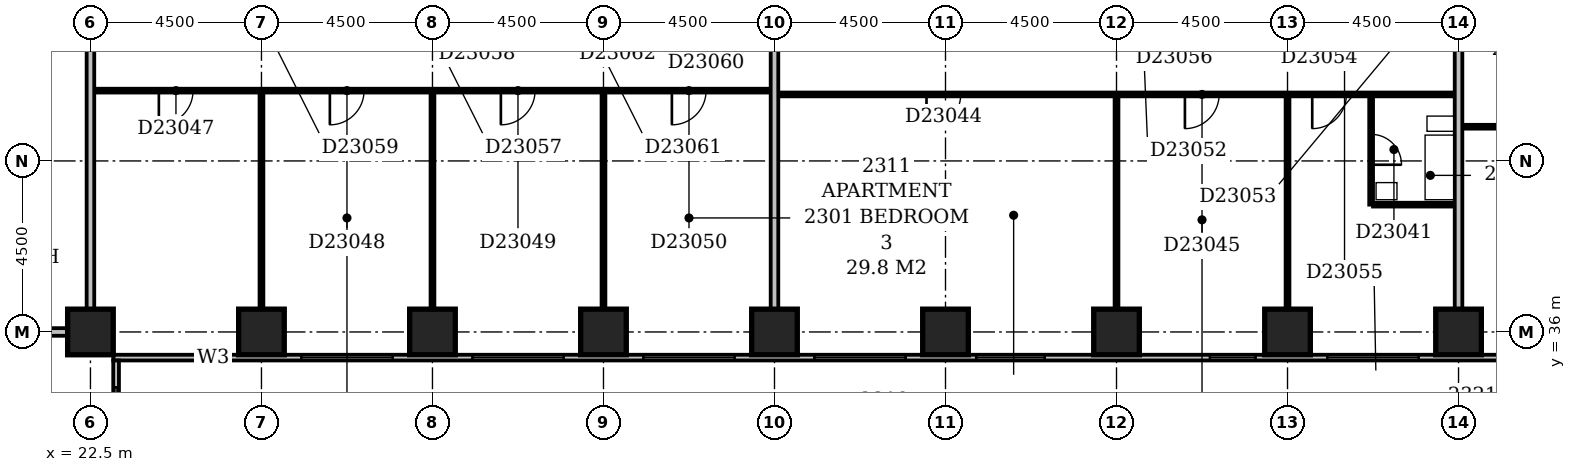
"""IFC4 building model, lengths in metres.
Left out: names, types, materials, properties, quantities, classifications, styles, units other than length and angle.
Written with IfcOpenShell. Run it as: python <this file> out.ifc"""

import sys

from ifc_helpers import new_model, si_unit, direction, frame, frame_2d, origin, origin_2d, place, context, subcontext, project, spatial, rectangle, extrude, element, fill, save


model = new_model("IFC4")
c1 = context("Model", 3, precision=1e-05, world=origin(), true_north=direction((0.0, 1.0)))
c2 = subcontext(c1, "Body", "Model", "MODEL_VIEW")
j1 = project(units=[si_unit("LENGTHUNIT", "METRE"), si_unit("PLANEANGLEUNIT", "RADIAN")], contexts=[c1])
p1 = place(None, origin())
s1 = spatial("IfcSite", under=j1, at=p1, CompositionType="ELEMENT")
p2 = place(p1, origin())
s2 = spatial("IfcBuilding", under=s1, at=p2, CompositionType="ELEMENT")
p3 = place(p2, frame((0.0, 0.0, 93.8)))
s3 = spatial("IfcBuildingStorey", under=s2, at=p3, CompositionType="ELEMENT", Elevation=93.8)
for number, where, z_axis, x_axis in (
    (1, (22.5, 36.0, -0.3), (0.0, 0.0, 1.0), (1.0, 0.0, 0.0)),
    (2, (27.0, 36.0, -0.3), (0.0, 0.0, 1.0), (1.0, 0.0, 0.0)),
    (3, (31.5, 36.0, -0.3), (0.0, 0.0, 1.0), (1.0, 0.0, 0.0)),
    (4, (36.0, 36.0, -0.3), (0.0, 0.0, 1.0), (1.0, 0.0, 0.0)),
    (5, (40.5, 36.0, -0.3), (0.0, 0.0, 1.0), (1.0, 0.0, 0.0)),
    (6, (45.0, 36.0, -0.3), (0.0, 0.0, 1.0), (1.0, 0.0, 0.0)),
    (7, (49.5, 36.0, -0.3), (0.0, 0.0, 1.0), (1.0, 0.0, 0.0)),
    (8, (54.0, 36.0, -0.3), (0.0, 0.0, 1.0), (1.0, 0.0, 0.0)),
    (9, (58.5, 36.0, -0.3), (0.0, 0.0, 1.0), (1.0, 0.0, 0.0)),
):
    element("IfcColumn", number, at=place(p3, frame(where, z_axis=z_axis, x_axis=x_axis)), inside=s3, PredefinedType="COLUMN", context=c2, shape_type="SweptSolid", body=[
        extrude(rectangle(XDim=1.2, YDim=1.2, at=origin_2d()), origin(), (0.0, 0.0, 1.0), 3.6),
    ])
p4 = place(p3, frame((23.175, 17.4, 0.0), z_axis=(0.0, 0.0, 1.0), x_axis=(0.0, 1.0, 0.0)))
e10 = element("IfcWall", 10, at=p4, inside=s3, PredefinedType="STANDARD", context=c2, shape_type="SweptSolid", body=[
    extrude(rectangle(XDim=17.85, YDim=0.15, at=frame_2d((8.925, 0.0))), origin(), (0.0, 0.0, 1.0), 2.7),
])
p5 = place(p4, frame((2.999, 0.0, 0.6)))
e11 = element("IfcOpeningElement", 11, at=p5, cuts=e10, PredefinedType="OPENING", context=c2, shape_type="SweptSolid", body=[
    extrude(rectangle(XDim=1.2, YDim=1.8, at=frame_2d((0.6, 0.9))), frame((0.0, 0.087, 0.0), z_axis=(0.0, -1.0, 0.0), x_axis=(1.0, 0.0, 0.0)), (0.0, 0.0, 1.0), 0.174),
])
p6 = place(p4, frame((6.15, 0.0, 0.6)))
e12 = element("IfcOpeningElement", 12, at=p6, cuts=e10, PredefinedType="OPENING", context=c2, shape_type="SweptSolid", body=[
    extrude(rectangle(XDim=2.4, YDim=1.8, at=frame_2d((1.2, 0.9))), frame((0.0, 0.087, 0.0), z_axis=(0.0, -1.0, 0.0), x_axis=(1.0, 0.0, 0.0)), (0.0, 0.0, 1.0), 0.174),
])
p7 = place(p4, frame((10.65, 0.0, 0.6)))
e13 = element("IfcOpeningElement", 13, at=p7, cuts=e10, PredefinedType="OPENING", context=c2, shape_type="SweptSolid", body=[
    extrude(rectangle(XDim=2.4, YDim=1.8, at=frame_2d((1.2, 0.9))), frame((0.0, 0.087, 0.0), z_axis=(0.0, -1.0, 0.0), x_axis=(1.0, 0.0, 0.0)), (0.0, 0.0, 1.0), 0.174),
])
p8 = place(p4, frame((15.043, 0.0, 0.6)))
e14 = element("IfcOpeningElement", 14, at=p8, cuts=e10, PredefinedType="OPENING", context=c2, shape_type="SweptSolid", body=[
    extrude(rectangle(XDim=2.1, YDim=1.8, at=frame_2d((1.05, 0.9))), frame((0.0, 0.087, 0.0), z_axis=(0.0, -1.0, 0.0), x_axis=(1.0, 0.0, 0.0)), (0.0, 0.0, 1.0), 0.174),
])
p9 = place(p3, frame((23.1, 35.325, 0.0), z_axis=(0.0, 0.0, 1.0), x_axis=(1.0, 0.0, 0.0)))
e15 = element("IfcWall", 15, at=p9, inside=s3, PredefinedType="STANDARD", context=c2, shape_type="SweptSolid", body=[
    extrude(rectangle(XDim=45.15, YDim=0.15, at=frame_2d((22.575, 0.0))), origin(), (0.0, 0.0, 1.0), 2.7),
])
p10 = place(p9, frame((2.185, 0.0, 0.6)))
e16 = element("IfcOpeningElement", 16, at=p10, cuts=e15, PredefinedType="OPENING", context=c2, shape_type="SweptSolid", body=[
    extrude(rectangle(XDim=0.9, YDim=1.8, at=frame_2d((0.45, 0.9))), frame((0.0, 0.087, 0.0), z_axis=(0.0, -1.0, 0.0), x_axis=(1.0, 0.0, 0.0)), (0.0, 0.0, 1.0), 0.174),
])
p11 = place(p9, frame((4.95, 0.0, 0.6)))
e17 = element("IfcOpeningElement", 17, at=p11, cuts=e15, PredefinedType="OPENING", context=c2, shape_type="SweptSolid", body=[
    extrude(rectangle(XDim=2.4, YDim=1.8, at=frame_2d((1.2, 0.9))), frame((0.0, 0.087, 0.0), z_axis=(0.0, -1.0, 0.0), x_axis=(1.0, 0.0, 0.0)), (0.0, 0.0, 1.0), 0.174),
])
p12 = place(p9, frame((9.45, 0.0, 0.6)))
e18 = element("IfcOpeningElement", 18, at=p12, cuts=e15, PredefinedType="OPENING", context=c2, shape_type="SweptSolid", body=[
    extrude(rectangle(XDim=2.4, YDim=1.8, at=frame_2d((1.2, 0.9))), frame((0.0, 0.087, 0.0), z_axis=(0.0, -1.0, 0.0), x_axis=(1.0, 0.0, 0.0)), (0.0, 0.0, 1.0), 0.174),
])
p13 = place(p9, frame((13.95, 0.0, 0.6)))
e19 = element("IfcOpeningElement", 19, at=p13, cuts=e15, PredefinedType="OPENING", context=c2, shape_type="SweptSolid", body=[
    extrude(rectangle(XDim=2.4, YDim=1.8, at=frame_2d((1.2, 0.9))), frame((0.0, 0.087, 0.0), z_axis=(0.0, -1.0, 0.0), x_axis=(1.0, 0.0, 0.0)), (0.0, 0.0, 1.0), 0.174),
])
p14 = place(p9, frame((18.45, 0.0, 0.6)))
e20 = element("IfcOpeningElement", 20, at=p14, cuts=e15, PredefinedType="OPENING", context=c2, shape_type="SweptSolid", body=[
    extrude(rectangle(XDim=2.4, YDim=1.8, at=frame_2d((1.2, 0.9))), frame((0.0, 0.087, 0.0), z_axis=(0.0, -1.0, 0.0), x_axis=(1.0, 0.0, 0.0)), (0.0, 0.0, 1.0), 0.174),
])
p15 = place(p9, frame((22.71, 0.0, 0.6)))
e21 = element("IfcOpeningElement", 21, at=p15, cuts=e15, PredefinedType="OPENING", context=c2, shape_type="SweptSolid", body=[
    extrude(rectangle(XDim=1.8, YDim=1.8, at=frame_2d((0.9, 0.9))), frame((0.0, 0.087, 0.0), z_axis=(0.0, -1.0, 0.0), x_axis=(1.0, 0.0, 0.0)), (0.0, 0.0, 1.0), 0.174),
])
p16 = place(p9, frame((28.859, 0.0, 0.6)))
e22 = element("IfcOpeningElement", 22, at=p16, cuts=e15, PredefinedType="OPENING", context=c2, shape_type="SweptSolid", body=[
    extrude(rectangle(XDim=1.2, YDim=1.8, at=frame_2d((0.6, 0.9))), frame((0.0, 0.087, 0.0), z_axis=(0.0, -1.0, 0.0), x_axis=(1.0, 0.0, 0.0)), (0.0, 0.0, 1.0), 0.174),
])
p17 = place(p9, frame((31.95, 0.0, 0.6)))
e23 = element("IfcOpeningElement", 23, at=p17, cuts=e15, PredefinedType="OPENING", context=c2, shape_type="SweptSolid", body=[
    extrude(rectangle(XDim=2.4, YDim=1.8, at=frame_2d((1.2, 0.9))), frame((0.0, 0.087, 0.0), z_axis=(0.0, -1.0, 0.0), x_axis=(1.0, 0.0, 0.0)), (0.0, 0.0, 1.0), 0.174),
])
p18 = place(p9, frame((36.45, 0.0, 0.6)))
e24 = element("IfcOpeningElement", 24, at=p18, cuts=e15, PredefinedType="OPENING", context=c2, shape_type="SweptSolid", body=[
    extrude(rectangle(XDim=2.4, YDim=1.8, at=frame_2d((1.2, 0.9))), frame((0.0, 0.087, 0.0), z_axis=(0.0, -1.0, 0.0), x_axis=(1.0, 0.0, 0.0)), (0.0, 0.0, 1.0), 0.174),
])
p19 = place(p9, frame((40.95, 0.0, 0.6)))
e25 = element("IfcOpeningElement", 25, at=p19, cuts=e15, PredefinedType="OPENING", context=c2, shape_type="SweptSolid", body=[
    extrude(rectangle(XDim=2.4, YDim=1.8, at=frame_2d((1.2, 0.9))), frame((0.0, 0.087, 0.0), z_axis=(0.0, -1.0, 0.0), x_axis=(1.0, 0.0, 0.0)), (0.0, 0.0, 1.0), 0.174),
])
p20 = place(p3, frame((9.1, 36.0, 0.0), z_axis=(0.0, 0.0, 1.0), x_axis=(1.0, 0.0, 0.0)))
e26 = element("IfcWall", 26, at=p20, inside=s3, PredefinedType="PARTITIONING", context=c2, shape_type="SweptSolid", body=[
    extrude(rectangle(XDim=12.8, YDim=0.2, at=frame_2d((6.4, 0.0))), origin(), (0.0, 0.0, 1.0), 2.4),
])
p21 = place(p3, frame((22.5, 36.6, 0.0), z_axis=(0.0, 0.0, 1.0), x_axis=(0.0, 1.0, 0.0)))
e27 = element("IfcWall", 27, at=p21, inside=s3, PredefinedType="PARTITIONING", context=c2, shape_type="SweptSolid", body=[
    extrude(rectangle(XDim=12.8, YDim=0.2, at=frame_2d((6.4, 0.0))), origin(), (0.0, 0.0, 1.0), 3.3),
])
p22 = place(p3, frame((27.0, 36.6, 0.0), z_axis=(0.0, 0.0, 1.0), x_axis=(0.0, 1.0, 0.0)))
e28 = element("IfcWall", 28, at=p22, inside=s3, PredefinedType="PARTITIONING", context=c2, shape_type="SweptSolid", body=[
    extrude(rectangle(XDim=5.7, YDim=0.1, at=frame_2d((2.85, 0.0))), origin(), (0.0, 0.0, 1.0), 2.6),
])
p23 = place(p3, frame((31.5, 36.6, 0.0), z_axis=(0.0, 0.0, 1.0), x_axis=(0.0, 1.0, 0.0)))
e29 = element("IfcWall", 29, at=p23, inside=s3, PredefinedType="PARTITIONING", context=c2, shape_type="SweptSolid", body=[
    extrude(rectangle(XDim=5.7, YDim=0.1, at=frame_2d((2.85, 0.0))), origin(), (0.0, 0.0, 1.0), 3.3),
])
p24 = place(p3, frame((36.0, 36.6, 0.0), z_axis=(0.0, 0.0, 1.0), x_axis=(0.0, 1.0, 0.0)))
e30 = element("IfcWall", 30, at=p24, inside=s3, PredefinedType="PARTITIONING", context=c2, shape_type="SweptSolid", body=[
    extrude(rectangle(XDim=5.7, YDim=0.1, at=frame_2d((2.85, 0.0))), origin(), (0.0, 0.0, 1.0), 2.4),
])
p25 = place(p3, frame((40.5, 36.6, 0.0), z_axis=(0.0, 0.0, 1.0), x_axis=(0.0, 1.0, 0.0)))
e31 = element("IfcWall", 31, at=p25, inside=s3, PredefinedType="PARTITIONING", context=c2, shape_type="SweptSolid", body=[
    extrude(rectangle(XDim=12.8, YDim=0.2, at=frame_2d((6.4, 0.0))), origin(), (0.0, 0.0, 1.0), 3.3),
])
p26 = place(p3, frame((49.5, 36.6, 0.0), z_axis=(0.0, 0.0, 1.0), x_axis=(0.0, 1.0, 0.0)))
e32 = element("IfcWall", 32, at=p26, inside=s3, PredefinedType="PARTITIONING", context=c2, shape_type="SweptSolid", body=[
    extrude(rectangle(XDim=5.6, YDim=0.1, at=frame_2d((2.8, 0.0))), origin(), (0.0, 0.0, 1.0), 3.3),
])
p27 = place(p3, frame((54.0, 36.6, 0.0), z_axis=(0.0, 0.0, 1.0), x_axis=(0.0, 1.0, 0.0)))
e33 = element("IfcWall", 33, at=p27, inside=s3, PredefinedType="PARTITIONING", context=c2, shape_type="SweptSolid", body=[
    extrude(rectangle(XDim=5.6, YDim=0.1, at=frame_2d((2.8, 0.0))), origin(), (0.0, 0.0, 1.0), 2.6),
])
p28 = place(p3, frame((58.5, 36.6, 0.0), z_axis=(0.0, 0.0, 1.0), x_axis=(0.0, 1.0, 0.0)))
e34 = element("IfcWall", 34, at=p28, inside=s3, PredefinedType="PARTITIONING", context=c2, shape_type="SweptSolid", body=[
    extrude(rectangle(XDim=12.8, YDim=0.2, at=frame_2d((6.4, 0.0))), origin(), (0.0, 0.0, 1.0), 3.3),
])
p29 = place(p3, frame((56.2, 39.35, 0.0), z_axis=(0.0, 0.0, 1.0), x_axis=(0.0, 1.0, 0.0)))
e35 = element("IfcWall", 35, at=p29, inside=s3, PredefinedType="PLUMBINGWALL", context=c2, shape_type="SweptSolid", body=[
    extrude(rectangle(XDim=2.85, YDim=0.1, at=frame_2d((1.425, 0.0))), origin(), (0.0, 0.0, 1.0), 3.3),
])
p30 = place(p29, frame((1.05, 0.0, 0.0)))
e36 = element("IfcOpeningElement", 36, at=p30, cuts=e35, PredefinedType="OPENING", context=c2, shape_type="SweptSolid", body=[
    extrude(rectangle(XDim=0.8, YDim=2.1, at=frame_2d((0.4, 1.05))), frame((0.0, 0.062, 0.0), z_axis=(0.0, -1.0, 0.0), x_axis=(1.0, 0.0, 0.0)), (0.0, 0.0, 1.0), 0.124),
])
p31 = place(p3, frame((56.25, 39.35, 0.0), z_axis=(0.0, 0.0, 1.0), x_axis=(1.0, 0.0, 0.0)))
e37 = element("IfcWall", 37, at=p31, inside=s3, PredefinedType="PLUMBINGWALL", context=c2, shape_type="SweptSolid", body=[
    extrude(rectangle(XDim=2.15, YDim=0.1, at=frame_2d((1.075, 0.0))), origin(), (0.0, 0.0, 1.0), 3.3),
])
p32 = place(p3, frame((58.6, 41.4, 0.0), z_axis=(0.0, 0.0, 1.0), x_axis=(1.0, 0.0, 0.0)))
e38 = element("IfcWall", 38, at=p32, inside=s3, PredefinedType="PARTITIONING", context=c2, shape_type="SweptSolid", body=[
    extrude(rectangle(XDim=9.5, YDim=0.1, at=frame_2d((4.75, 0.0))), origin(), (0.0, 0.0, 1.0), 3.3),
])
p33 = place(p32, frame((1.7, 0.0, 0.0)))
e39 = element("IfcOpeningElement", 39, at=p33, cuts=e38, PredefinedType="OPENING", context=c2, shape_type="SweptSolid", body=[
    extrude(rectangle(XDim=0.9, YDim=2.1, at=frame_2d((0.45, 1.05))), frame((0.0, 0.062, 0.0), z_axis=(0.0, -1.0, 0.0), x_axis=(1.0, 0.0, 0.0)), (0.0, 0.0, 1.0), 0.124),
])
p34 = place(p32, frame((6.2, 0.0, 0.0)))
e40 = element("IfcOpeningElement", 40, at=p34, cuts=e38, PredefinedType="OPENING", context=c2, shape_type="SweptSolid", body=[
    extrude(rectangle(XDim=0.9, YDim=2.1, at=frame_2d((0.45, 1.05))), frame((0.0, 0.062, 0.0), z_axis=(0.0, -1.0, 0.0), x_axis=(1.0, 0.0, 0.0)), (0.0, 0.0, 1.0), 0.124),
])
p35 = place(p3, frame((40.6, 42.25, 0.0), z_axis=(0.0, 0.0, 1.0), x_axis=(1.0, 0.0, 0.0)))
e41 = element("IfcWall", 41, at=p35, inside=s3, PredefinedType="PARTITIONING", context=c2, shape_type="SweptSolid", body=[
    extrude(rectangle(XDim=17.8, YDim=0.1, at=frame_2d((8.9, 0.0))), origin(), (0.0, 0.0, 1.0), 3.3),
])
p36 = place(p35, frame((3.9, 0.0, 0.0)))
e42 = element("IfcOpeningElement", 42, at=p36, cuts=e41, PredefinedType="OPENING", context=c2, shape_type="SweptSolid", body=[
    extrude(rectangle(XDim=0.9, YDim=2.1, at=frame_2d((0.45, 1.05))), frame((0.0, 0.062, 0.0), z_axis=(0.0, -1.0, 0.0), x_axis=(1.0, 0.0, 0.0)), (0.0, 0.0, 1.0), 0.124),
])
p37 = place(p35, frame((10.7, 0.0, 0.0)))
e43 = element("IfcOpeningElement", 43, at=p37, cuts=e41, PredefinedType="OPENING", context=c2, shape_type="SweptSolid", body=[
    extrude(rectangle(XDim=0.9, YDim=2.1, at=frame_2d((0.45, 1.05))), frame((0.0, 0.062, 0.0), z_axis=(0.0, -1.0, 0.0), x_axis=(1.0, 0.0, 0.0)), (0.0, 0.0, 1.0), 0.124),
])
p38 = place(p35, frame((14.05, 0.0, 0.0)))
e44 = element("IfcOpeningElement", 44, at=p38, cuts=e41, PredefinedType="OPENING", context=c2, shape_type="SweptSolid", body=[
    extrude(rectangle(XDim=0.9, YDim=2.1, at=frame_2d((0.45, 1.05))), frame((0.0, 0.062, 0.0), z_axis=(0.0, -1.0, 0.0), x_axis=(1.0, 0.0, 0.0)), (0.0, 0.0, 1.0), 0.124),
])
p39 = place(p3, frame((22.6, 42.35, 0.0), z_axis=(0.0, 0.0, 1.0), x_axis=(1.0, 0.0, 0.0)))
e45 = element("IfcWall", 45, at=p39, inside=s3, PredefinedType="PARTITIONING", context=c2, shape_type="SweptSolid", body=[
    extrude(rectangle(XDim=17.8, YDim=0.1, at=frame_2d((8.9, 0.0))), origin(), (0.0, 0.0, 1.0), 3.3),
])
p40 = place(p39, frame((1.7, 0.0, 0.0)))
e46 = element("IfcOpeningElement", 46, at=p40, cuts=e45, PredefinedType="OPENING", context=c2, shape_type="SweptSolid", body=[
    extrude(rectangle(XDim=0.9, YDim=2.1, at=frame_2d((0.45, 1.05))), frame((0.0, 0.062, 0.0), z_axis=(0.0, -1.0, 0.0), x_axis=(1.0, 0.0, 0.0)), (0.0, 0.0, 1.0), 0.124),
])
p41 = place(p39, frame((6.2, 0.0, 0.0)))
e47 = element("IfcOpeningElement", 47, at=p41, cuts=e45, PredefinedType="OPENING", context=c2, shape_type="SweptSolid", body=[
    extrude(rectangle(XDim=0.9, YDim=2.1, at=frame_2d((0.45, 1.05))), frame((0.0, 0.062, 0.0), z_axis=(0.0, -1.0, 0.0), x_axis=(1.0, 0.0, 0.0)), (0.0, 0.0, 1.0), 0.124),
])
p42 = place(p39, frame((10.7, 0.0, 0.0)))
e48 = element("IfcOpeningElement", 48, at=p42, cuts=e45, PredefinedType="OPENING", context=c2, shape_type="SweptSolid", body=[
    extrude(rectangle(XDim=0.9, YDim=2.1, at=frame_2d((0.45, 1.05))), frame((0.0, 0.062, 0.0), z_axis=(0.0, -1.0, 0.0), x_axis=(1.0, 0.0, 0.0)), (0.0, 0.0, 1.0), 0.124),
])
p43 = place(p39, frame((15.2, 0.0, 0.0)))
e49 = element("IfcOpeningElement", 49, at=p43, cuts=e45, PredefinedType="OPENING", context=c2, shape_type="SweptSolid", body=[
    extrude(rectangle(XDim=0.9, YDim=2.1, at=frame_2d((0.45, 1.05))), frame((0.0, 0.062, 0.0), z_axis=(0.0, -1.0, 0.0), x_axis=(1.0, 0.0, 0.0)), (0.0, 0.0, 1.0), 0.124),
])
p44 = place(p8, origin())
e50 = element("IfcWindow", 50, at=p44, inside=s3, PartitioningType="SINGLE_PANEL", PredefinedType="WINDOW", context=c2, shape_type="SweptSolid", body=[
    extrude(rectangle(XDim=2.1, YDim=1.8, at=frame_2d((1.05, 0.9))), frame((0.0, 0.03, 0.0), z_axis=(0.0, -1.0, 0.0), x_axis=(1.0, 0.0, 0.0)), (0.0, 0.0, 1.0), 0.06),
])
fill(e14, e50)
p45 = place(p10, origin())
e51 = element("IfcWindow", 51, at=p45, inside=s3, PartitioningType="SINGLE_PANEL", PredefinedType="WINDOW", context=c2, shape_type="SweptSolid", body=[
    extrude(rectangle(XDim=0.9, YDim=1.8, at=frame_2d((0.45, 0.9))), frame((0.0, 0.03, 0.0), z_axis=(0.0, -1.0, 0.0), x_axis=(1.0, 0.0, 0.0)), (0.0, 0.0, 1.0), 0.06),
])
fill(e16, e51)
p46 = place(p11, origin())
e52 = element("IfcWindow", 52, at=p46, inside=s3, PartitioningType="SINGLE_PANEL", PredefinedType="WINDOW", context=c2, shape_type="SweptSolid", body=[
    extrude(rectangle(XDim=2.4, YDim=1.8, at=frame_2d((1.2, 0.9))), frame((0.0, 0.03, 0.0), z_axis=(0.0, -1.0, 0.0), x_axis=(1.0, 0.0, 0.0)), (0.0, 0.0, 1.0), 0.06),
])
fill(e17, e52)
p47 = place(p12, origin())
e53 = element("IfcWindow", 53, at=p47, inside=s3, PartitioningType="SINGLE_PANEL", PredefinedType="WINDOW", context=c2, shape_type="SweptSolid", body=[
    extrude(rectangle(XDim=2.4, YDim=1.8, at=frame_2d((1.2, 0.9))), frame((0.0, 0.03, 0.0), z_axis=(0.0, -1.0, 0.0), x_axis=(1.0, 0.0, 0.0)), (0.0, 0.0, 1.0), 0.06),
])
fill(e18, e53)
p48 = place(p13, origin())
e54 = element("IfcWindow", 54, at=p48, inside=s3, PartitioningType="SINGLE_PANEL", PredefinedType="WINDOW", context=c2, shape_type="SweptSolid", body=[
    extrude(rectangle(XDim=2.4, YDim=1.8, at=frame_2d((1.2, 0.9))), frame((0.0, 0.03, 0.0), z_axis=(0.0, -1.0, 0.0), x_axis=(1.0, 0.0, 0.0)), (0.0, 0.0, 1.0), 0.06),
])
fill(e19, e54)
p49 = place(p14, origin())
e55 = element("IfcWindow", 55, at=p49, inside=s3, PartitioningType="SINGLE_PANEL", PredefinedType="WINDOW", context=c2, shape_type="SweptSolid", body=[
    extrude(rectangle(XDim=2.4, YDim=1.8, at=frame_2d((1.2, 0.9))), frame((0.0, 0.03, 0.0), z_axis=(0.0, -1.0, 0.0), x_axis=(1.0, 0.0, 0.0)), (0.0, 0.0, 1.0), 0.06),
])
fill(e20, e55)
p50 = place(p15, origin())
e56 = element("IfcWindow", 56, at=p50, inside=s3, PartitioningType="SINGLE_PANEL", PredefinedType="WINDOW", context=c2, shape_type="SweptSolid", body=[
    extrude(rectangle(XDim=1.8, YDim=1.8, at=frame_2d((0.9, 0.9))), frame((0.0, 0.03, 0.0), z_axis=(0.0, -1.0, 0.0), x_axis=(1.0, 0.0, 0.0)), (0.0, 0.0, 1.0), 0.06),
])
fill(e21, e56)
p51 = place(p16, origin())
e57 = element("IfcWindow", 57, at=p51, inside=s3, PartitioningType="SINGLE_PANEL", PredefinedType="WINDOW", context=c2, shape_type="SweptSolid", body=[
    extrude(rectangle(XDim=1.2, YDim=1.8, at=frame_2d((0.6, 0.9))), frame((0.0, 0.03, 0.0), z_axis=(0.0, -1.0, 0.0), x_axis=(1.0, 0.0, 0.0)), (0.0, 0.0, 1.0), 0.06),
])
fill(e22, e57)
p52 = place(p17, origin())
e58 = element("IfcWindow", 58, at=p52, inside=s3, PartitioningType="SINGLE_PANEL", PredefinedType="WINDOW", context=c2, shape_type="SweptSolid", body=[
    extrude(rectangle(XDim=2.4, YDim=1.8, at=frame_2d((1.2, 0.9))), frame((0.0, 0.03, 0.0), z_axis=(0.0, -1.0, 0.0), x_axis=(1.0, 0.0, 0.0)), (0.0, 0.0, 1.0), 0.06),
])
fill(e23, e58)
p53 = place(p30, frame((0.8, 0.0, 0.0), z_axis=(0.0, 0.0, 1.0), x_axis=(-1.0, 0.0, 0.0)))
e59 = element("IfcDoor", 59, at=p53, inside=s3, OperationType="SINGLE_SWING_RIGHT", PredefinedType="DOOR", context=c2, shape_type="SweptSolid", body=[
    extrude(rectangle(XDim=0.8, YDim=2.1, at=frame_2d((0.4, 1.05))), frame((0.0, 0.025, 0.0), z_axis=(0.0, -1.0, 0.0), x_axis=(1.0, 0.0, 0.0)), (0.0, 0.0, 1.0), 0.05),
])
fill(e36, e59)
p54 = place(p36, frame((0.9, 0.0, 0.0), z_axis=(0.0, 0.0, 1.0), x_axis=(-1.0, 0.0, 0.0)))
e60 = element("IfcDoor", 60, at=p54, inside=s3, OperationType="SINGLE_SWING_RIGHT", PredefinedType="DOOR", context=c2, shape_type="SweptSolid", body=[
    extrude(rectangle(XDim=0.9, YDim=2.1, at=frame_2d((0.45, 1.05))), frame((0.0, 0.025, 0.0), z_axis=(0.0, -1.0, 0.0), x_axis=(1.0, 0.0, 0.0)), (0.0, 0.0, 1.0), 0.05),
])
fill(e42, e60)
p55 = place(p37, frame((0.9, 0.0, 0.0), z_axis=(0.0, 0.0, 1.0), x_axis=(-1.0, 0.0, 0.0)))
e61 = element("IfcDoor", 61, at=p55, inside=s3, OperationType="SINGLE_SWING_RIGHT", PredefinedType="DOOR", context=c2, shape_type="SweptSolid", body=[
    extrude(rectangle(XDim=0.9, YDim=2.1, at=frame_2d((0.45, 1.05))), frame((0.0, 0.025, 0.0), z_axis=(0.0, -1.0, 0.0), x_axis=(1.0, 0.0, 0.0)), (0.0, 0.0, 1.0), 0.05),
])
fill(e43, e61)
p56 = place(p38, frame((0.9, 0.0, 0.0), z_axis=(0.0, 0.0, 1.0), x_axis=(-1.0, 0.0, 0.0)))
e62 = element("IfcDoor", 62, at=p56, inside=s3, OperationType="SINGLE_SWING_RIGHT", PredefinedType="DOOR", context=c2, shape_type="SweptSolid", body=[
    extrude(rectangle(XDim=0.9, YDim=2.1, at=frame_2d((0.45, 1.05))), frame((0.0, 0.025, 0.0), z_axis=(0.0, -1.0, 0.0), x_axis=(1.0, 0.0, 0.0)), (0.0, 0.0, 1.0), 0.05),
])
fill(e44, e62)
p57 = place(p40, frame((0.9, 0.0, 0.0), z_axis=(0.0, 0.0, 1.0), x_axis=(-1.0, 0.0, 0.0)))
e63 = element("IfcDoor", 63, at=p57, inside=s3, OperationType="SINGLE_SWING_RIGHT", PredefinedType="DOOR", context=c2, shape_type="SweptSolid", body=[
    extrude(rectangle(XDim=0.9, YDim=2.1, at=frame_2d((0.45, 1.05))), frame((0.0, 0.025, 0.0), z_axis=(0.0, -1.0, 0.0), x_axis=(1.0, 0.0, 0.0)), (0.0, 0.0, 1.0), 0.05),
])
fill(e46, e63)
p58 = place(p41, frame((0.9, 0.0, 0.0), z_axis=(0.0, 0.0, 1.0), x_axis=(-1.0, 0.0, 0.0)))
e64 = element("IfcDoor", 64, at=p58, inside=s3, OperationType="SINGLE_SWING_RIGHT", PredefinedType="DOOR", context=c2, shape_type="SweptSolid", body=[
    extrude(rectangle(XDim=0.9, YDim=2.1, at=frame_2d((0.45, 1.05))), frame((0.0, 0.025, 0.0), z_axis=(0.0, -1.0, 0.0), x_axis=(1.0, 0.0, 0.0)), (0.0, 0.0, 1.0), 0.05),
])
fill(e47, e64)
p59 = place(p42, frame((0.9, 0.0, 0.0), z_axis=(0.0, 0.0, 1.0), x_axis=(-1.0, 0.0, 0.0)))
e65 = element("IfcDoor", 65, at=p59, inside=s3, OperationType="SINGLE_SWING_RIGHT", PredefinedType="DOOR", context=c2, shape_type="SweptSolid", body=[
    extrude(rectangle(XDim=0.9, YDim=2.1, at=frame_2d((0.45, 1.05))), frame((0.0, 0.025, 0.0), z_axis=(0.0, -1.0, 0.0), x_axis=(1.0, 0.0, 0.0)), (0.0, 0.0, 1.0), 0.05),
])
fill(e48, e65)
p60 = place(p43, frame((0.9, 0.0, 0.0), z_axis=(0.0, 0.0, 1.0), x_axis=(-1.0, 0.0, 0.0)))
e66 = element("IfcDoor", 66, at=p60, inside=s3, OperationType="SINGLE_SWING_RIGHT", PredefinedType="DOOR", context=c2, shape_type="SweptSolid", body=[
    extrude(rectangle(XDim=0.9, YDim=2.1, at=frame_2d((0.45, 1.05))), frame((0.0, 0.025, 0.0), z_axis=(0.0, -1.0, 0.0), x_axis=(1.0, 0.0, 0.0)), (0.0, 0.0, 1.0), 0.05),
])
fill(e49, e66)
save(model, sys.argv[1])
